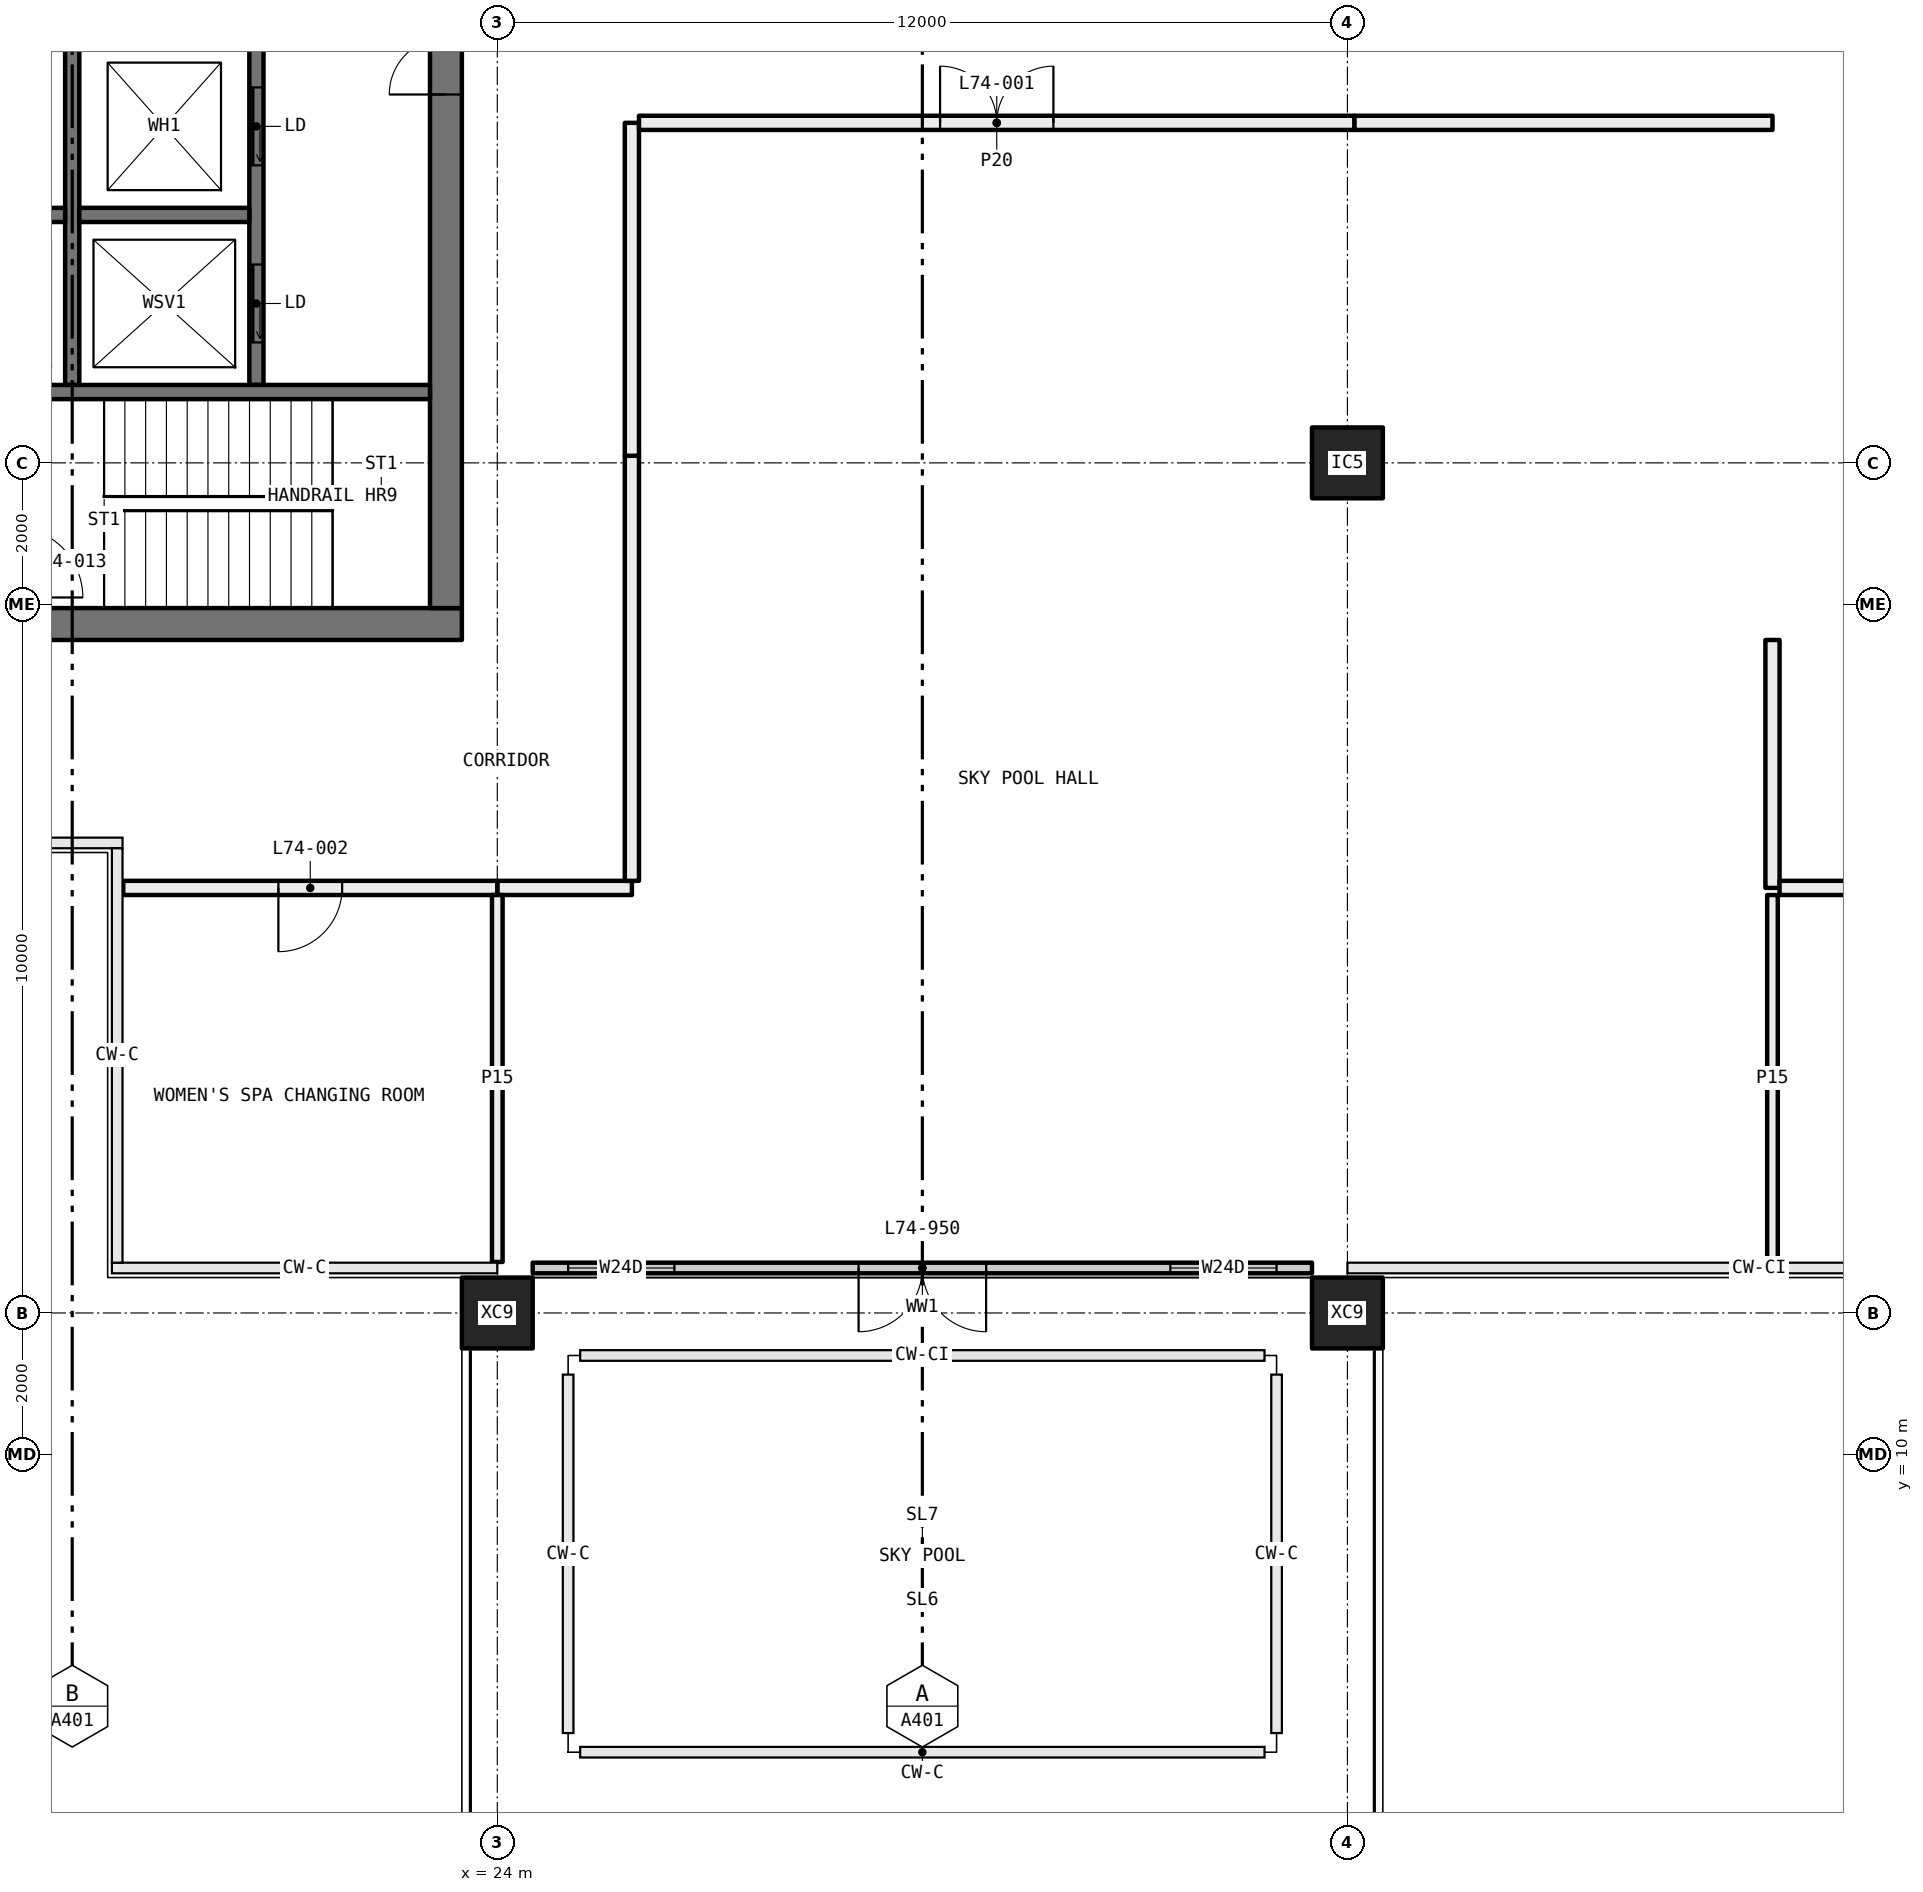
"""IFC4 building model, lengths in metres.
Left out: names, types, materials, properties, quantities, classifications, styles, units other than length and angle.
Written with IfcOpenShell. Run it as: python <this file> out.ifc"""

import sys

from ifc_helpers import new_model, si_unit, direction, frame, frame_2d, origin, origin_2d, place, context, subcontext, project, spatial, rectangle, hollow_rectangle, extrude, element, fill, save


model = new_model("IFC4")
c1 = context("Model", 3, precision=1e-05, world=origin(), true_north=direction((0.0, 1.0)))
c2 = subcontext(c1, "Body", "Model", "MODEL_VIEW")
j1 = project(units=[si_unit("LENGTHUNIT", "METRE"), si_unit("PLANEANGLEUNIT", "RADIAN")], contexts=[c1])
p1 = place(None, origin())
s1 = spatial("IfcSite", under=j1, at=p1, CompositionType="ELEMENT")
p2 = place(p1, origin())
s2 = spatial("IfcBuilding", under=s1, at=p2, CompositionType="ELEMENT")
p3 = place(p2, frame((0.0, 0.0, 273.15)))
s3 = spatial("IfcBuildingStorey", under=s2, at=p3, CompositionType="ELEMENT", Elevation=273.15)
for number, where, z_axis, x_axis in (
    (1, (24.0, 12.0, -0.4), (0.0, 0.0, 1.0), (1.0, 0.0, 0.0)),
    (2, (36.0, 12.0, -0.4), (0.0, 0.0, 1.0), (1.0, 0.0, 0.0)),
):
    element("IfcColumn", number, at=place(p3, frame(where, z_axis=z_axis, x_axis=x_axis)), inside=s3, PredefinedType="COLUMN", context=c2, shape_type="SweptSolid", body=[
        extrude(hollow_rectangle(XDim=1.0, YDim=1.0, WallThickness=0.036, at=origin_2d()), origin(), (0.0, 0.0, 1.0), 4.8),
    ])
p4 = place(p3, frame((36.0, 24.0, 0.0), z_axis=(0.0, 0.0, 1.0), x_axis=(1.0, 0.0, 0.0)))
e3 = element("IfcColumn", 3, at=p4, inside=s3, PredefinedType="COLUMN", context=c2, shape_type="SweptSolid", body=[
    extrude(hollow_rectangle(XDim=1.0, YDim=1.0, WallThickness=0.04, at=origin_2d()), origin(), (0.0, 0.0, 1.0), 4.4),
])
p5 = place(p3, frame((24.0, 18.0, 0.0), z_axis=(0.0, 0.0, 1.0), x_axis=(1.0, 0.0, 0.0)))
e4 = element("IfcWall", 4, at=p5, inside=s3, PredefinedType="PARTITIONING", context=c2, shape_type="SweptSolid", body=[
    extrude(rectangle(XDim=1.9, YDim=0.2, at=frame_2d((0.95, 0.0))), origin(), (0.0, 0.0, 1.0), 4.4),
])
p6 = place(p3, frame((25.9, 18.1, 0.0), z_axis=(0.0, 0.0, 1.0), x_axis=(0.0, 1.0, 0.0)))
e5 = element("IfcWall", 5, at=p6, inside=s3, PredefinedType="PARTITIONING", context=c2, shape_type="SweptSolid", body=[
    extrude(rectangle(XDim=6.0, YDim=0.2, at=frame_2d((3.0, 0.0))), origin(), (0.0, 0.0, 1.0), 3.8),
])
p7 = place(p3, frame((25.9, 24.1, 0.0), z_axis=(0.0, 0.0, 1.0), x_axis=(0.0, 1.0, 0.0)))
e6 = element("IfcWall", 6, at=p7, inside=s3, PredefinedType="PARTITIONING", context=c2, shape_type="SweptSolid", body=[
    extrude(rectangle(XDim=4.7, YDim=0.2, at=frame_2d((2.35, 0.0))), origin(), (0.0, 0.0, 1.0), 4.4),
])
p8 = place(p3, frame((26.0, 28.8, 0.0), z_axis=(0.0, 0.0, 1.0), x_axis=(1.0, 0.0, 0.0)))
e7 = element("IfcWall", 7, at=p8, inside=s3, PredefinedType="PARTITIONING", context=c2, shape_type="SweptSolid", body=[
    extrude(rectangle(XDim=10.1, YDim=0.2, at=frame_2d((5.05, 0.0))), origin(), (0.0, 0.0, 1.0), 3.8),
])
p9 = place(p8, frame((4.25, 0.0, 0.0)))
e8 = element("IfcOpeningElement", 8, at=p9, cuts=e7, PredefinedType="OPENING", context=c2, shape_type="SweptSolid", body=[
    extrude(rectangle(XDim=1.6, YDim=2.1, at=frame_2d((0.8, 1.05))), frame((0.0, 0.11, 0.0), z_axis=(0.0, -1.0, 0.0), x_axis=(1.0, 0.0, 0.0)), (0.0, 0.0, 1.0), 0.22),
])
p10 = place(p3, frame((36.1, 28.8, 0.0), z_axis=(0.0, 0.0, 1.0), x_axis=(1.0, 0.0, 0.0)))
e9 = element("IfcWall", 9, at=p10, inside=s3, PredefinedType="PARTITIONING", context=c2, shape_type="SweptSolid", body=[
    extrude(rectangle(XDim=5.9, YDim=0.2, at=frame_2d((2.95, 0.0))), origin(), (0.0, 0.0, 1.0), 4.4),
])
p11 = place(p3, frame((42.0, 21.5, 0.0), z_axis=(0.0, 0.0, 1.0), x_axis=(0.0, -1.0, 0.0)))
e10 = element("IfcWall", 10, at=p11, inside=s3, PredefinedType="PARTITIONING", context=c2, shape_type="SweptSolid", body=[
    extrude(rectangle(XDim=3.5, YDim=0.2, at=frame_2d((1.75, 0.0))), origin(), (0.0, 0.0, 1.0), 4.4),
])
p12 = place(p3, frame((18.72, 18.0, 0.0), z_axis=(0.0, 0.0, 1.0), x_axis=(1.0, 0.0, 0.0)))
e11 = element("IfcWall", 11, at=p12, inside=s3, PredefinedType="PARTITIONING", context=c2, shape_type="SweptSolid", body=[
    extrude(rectangle(XDim=5.28, YDim=0.2, at=frame_2d((2.64, 0.0))), origin(), (0.0, 0.0, 1.0), 4.4),
])
p13 = place(p12, frame((2.19, 0.0, 0.0)))
e12 = element("IfcOpeningElement", 12, at=p13, cuts=e11, PredefinedType="OPENING", context=c2, shape_type="SweptSolid", body=[
    extrude(rectangle(XDim=0.9, YDim=2.1, at=frame_2d((0.45, 1.05))), frame((0.0, 0.11, 0.0), z_axis=(0.0, -1.0, 0.0), x_axis=(1.0, 0.0, 0.0)), (0.0, 0.0, 1.0), 0.22),
])
p14 = place(p3, frame((42.1, 18.0, 0.0), z_axis=(0.0, 0.0, 1.0), x_axis=(1.0, 0.0, 0.0)))
e13 = element("IfcWall", 13, at=p14, inside=s3, PredefinedType="PARTITIONING", context=c2, shape_type="SweptSolid", body=[
    extrude(rectangle(XDim=11.18, YDim=0.2, at=frame_2d((5.59, 0.0))), origin(), (0.0, 0.0, 1.0), 4.4),
])
p15 = place(p14, frame((5.14, 0.0, 0.0)))
e14 = element("IfcOpeningElement", 14, at=p15, cuts=e13, PredefinedType="OPENING", context=c2, shape_type="SweptSolid", body=[
    extrude(rectangle(XDim=0.9, YDim=2.1, at=frame_2d((0.45, 1.05))), frame((0.0, 0.11, 0.0), z_axis=(0.0, -1.0, 0.0), x_axis=(1.0, 0.0, 0.0)), (0.0, 0.0, 1.0), 0.22),
])
for number, where, z_axis, x_axis in (
    (15, (24.0, 17.9, 0.0), (0.0, 0.0, 1.0), (0.0, -1.0, 0.0)),
    (16, (42.0, 12.72, 0.0), (0.0, 0.0, 1.0), (0.0, 1.0, 0.0)),
):
    element("IfcWall", number, at=place(p3, frame(where, z_axis=z_axis, x_axis=x_axis)), inside=s3, PredefinedType="PARTITIONING", context=c2, shape_type="SweptSolid", body=[
        extrude(rectangle(XDim=5.18, YDim=0.15, at=frame_2d((2.59, 0.0))), origin(), (0.0, 0.0, 1.0), 4.4),
    ])
p16 = place(p3, frame((12.5, 21.725, 0.0), z_axis=(0.0, 0.0, 1.0), x_axis=(1.0, 0.0, 0.0)))
e17 = element("IfcWall", 17, at=p16, inside=s3, PredefinedType="SHEAR", context=c2, shape_type="SweptSolid", body=[
    extrude(rectangle(XDim=11.0, YDim=0.45, at=frame_2d((5.5, 0.0))), origin(), (0.0, 0.0, 1.0), 4.4),
])
p17 = place(p16, frame((1.125, 0.0, 0.0)))
e18 = element("IfcOpeningElement", 18, at=p17, cuts=e17, PredefinedType="OPENING", context=c2, shape_type="SweptSolid", body=[
    extrude(rectangle(XDim=1.0, YDim=2.1, at=frame_2d((0.5, 1.05))), frame((0.0, 0.235, 0.0), z_axis=(0.0, -1.0, 0.0), x_axis=(1.0, 0.0, 0.0)), (0.0, 0.0, 1.0), 0.47),
])
p18 = place(p3, frame((23.275, 21.95, 0.0), z_axis=(0.0, 0.0, 1.0), x_axis=(0.0, 1.0, 0.0)))
e19 = element("IfcWall", 19, at=p18, inside=s3, PredefinedType="SHEAR", context=c2, shape_type="SweptSolid", body=[
    extrude(rectangle(XDim=16.1, YDim=0.45, at=frame_2d((8.05, 0.0))), origin(), (0.0, 0.0, 1.0), 4.4),
])
p19 = place(p18, frame((7.25, 0.0, 0.0)))
e20 = element("IfcOpeningElement", 20, at=p19, cuts=e19, PredefinedType="OPENING", context=c2, shape_type="SweptSolid", body=[
    extrude(rectangle(XDim=1.6, YDim=2.1, at=frame_2d((0.8, 1.05))), frame((0.0, 0.235, 0.0), z_axis=(0.0, -1.0, 0.0), x_axis=(1.0, 0.0, 0.0)), (0.0, 0.0, 1.0), 0.47),
])
p20 = place(p3, frame((20.6, 25.1, 0.0), z_axis=(0.0, 0.0, 1.0), x_axis=(0.0, 1.0, 0.0)))
e21 = element("IfcWall", 21, at=p20, inside=s3, PredefinedType="SOLIDWALL", context=c2, shape_type="SweptSolid", body=[
    extrude(rectangle(XDim=12.95, YDim=0.2, at=frame_2d((6.475, 0.0))), origin(), (0.0, 0.0, 1.0), 4.4),
])
p21 = place(p20, frame((0.6, 0.0, 0.0)))
e22 = element("IfcOpeningElement", 22, at=p21, cuts=e21, PredefinedType="OPENING", context=c2, shape_type="SweptSolid", body=[
    extrude(rectangle(XDim=1.1, YDim=2.1, at=frame_2d((0.55, 1.05))), frame((0.0, 0.11, 0.0), z_axis=(0.0, -1.0, 0.0), x_axis=(1.0, 0.0, 0.0)), (0.0, 0.0, 1.0), 0.22),
])
p22 = place(p20, frame((3.1, 0.0, 0.0)))
e23 = element("IfcOpeningElement", 23, at=p22, cuts=e21, PredefinedType="OPENING", context=c2, shape_type="SweptSolid", body=[
    extrude(rectangle(XDim=1.1, YDim=2.1, at=frame_2d((0.55, 1.05))), frame((0.0, 0.11, 0.0), z_axis=(0.0, -1.0, 0.0), x_axis=(1.0, 0.0, 0.0)), (0.0, 0.0, 1.0), 0.22),
])
p23 = place(p20, frame((5.6, 0.0, 0.0)))
e24 = element("IfcOpeningElement", 24, at=p23, cuts=e21, PredefinedType="OPENING", context=c2, shape_type="SweptSolid", body=[
    extrude(rectangle(XDim=1.1, YDim=2.1, at=frame_2d((0.55, 1.05))), frame((0.0, 0.11, 0.0), z_axis=(0.0, -1.0, 0.0), x_axis=(1.0, 0.0, 0.0)), (0.0, 0.0, 1.0), 0.22),
])
p24 = place(p20, frame((8.1, 0.0, 0.0)))
e25 = element("IfcOpeningElement", 25, at=p24, cuts=e21, PredefinedType="OPENING", context=c2, shape_type="SweptSolid", body=[
    extrude(rectangle(XDim=1.1, YDim=2.1, at=frame_2d((0.55, 1.05))), frame((0.0, 0.11, 0.0), z_axis=(0.0, -1.0, 0.0), x_axis=(1.0, 0.0, 0.0)), (0.0, 0.0, 1.0), 0.22),
])
p25 = place(p20, frame((10.975, 0.0, 0.0)))
e26 = element("IfcOpeningElement", 26, at=p25, cuts=e21, PredefinedType="OPENING", context=c2, shape_type="SweptSolid", body=[
    extrude(rectangle(XDim=1.0, YDim=2.1, at=frame_2d((0.5, 1.05))), frame((0.0, 0.11, 0.0), z_axis=(0.0, -1.0, 0.0), x_axis=(1.0, 0.0, 0.0)), (0.0, 0.0, 1.0), 0.22),
])
p26 = place(p3, frame((18.0, 25.1, 0.0), z_axis=(0.0, 0.0, 1.0), x_axis=(0.0, 1.0, 0.0)))
e27 = element("IfcWall", 27, at=p26, inside=s3, PredefinedType="SOLIDWALL", context=c2, shape_type="SweptSolid", body=[
    extrude(rectangle(XDim=9.8, YDim=0.2, at=frame_2d((4.9, 0.0))), origin(), (0.0, 0.0, 1.0), 4.4),
])
p27 = place(p3, frame((15.5, 25.0, 0.0), z_axis=(0.0, 0.0, 1.0), x_axis=(1.0, 0.0, 0.0)))
e28 = element("IfcWall", 28, at=p27, inside=s3, PredefinedType="SOLIDWALL", context=c2, shape_type="SweptSolid", body=[
    extrude(rectangle(XDim=7.55, YDim=0.2, at=frame_2d((3.775, 0.0))), origin(), (0.0, 0.0, 1.0), 4.4),
])
for number, where, z_axis, x_axis in (
    (29, (15.5, 27.5, 0.0), (0.0, 0.0, 1.0), (1.0, 0.0, 0.0)),
    (30, (18.1, 27.5, 0.0), (0.0, 0.0, 1.0), (1.0, 0.0, 0.0)),
):
    element("IfcWall", number, at=place(p3, frame(where, z_axis=z_axis, x_axis=x_axis)), inside=s3, PredefinedType="SOLIDWALL", context=c2, shape_type="SweptSolid", body=[
        extrude(rectangle(XDim=2.4, YDim=0.2, at=frame_2d((1.2, 0.0))), origin(), (0.0, 0.0, 1.0), 4.4),
    ])
p28 = place(p3, frame((24.5, 12.635, 0.0), z_axis=(0.0, 0.0, 1.0), x_axis=(1.0, 0.0, 0.0)))
e31 = element("IfcWall", 31, at=p28, inside=s3, PredefinedType="ELEMENTEDWALL", context=c2, shape_type="SweptSolid", body=[
    extrude(rectangle(XDim=11.0, YDim=0.15, at=frame_2d((5.5, 0.0))), origin(), (0.0, 0.0, 1.0), 4.4),
])
p29 = place(p28, frame((0.5, 0.0, 0.45)))
e32 = element("IfcOpeningElement", 32, at=p29, cuts=e31, PredefinedType="OPENING", context=c2, shape_type="SweptSolid", body=[
    extrude(rectangle(XDim=1.5, YDim=3.6, at=frame_2d((0.75, 1.8))), frame((0.0, 0.085, 0.0), z_axis=(0.0, -1.0, 0.0), x_axis=(1.0, 0.0, 0.0)), (0.0, 0.0, 1.0), 0.17),
])
p30 = place(p28, frame((9.0, 0.0, 0.45)))
e33 = element("IfcOpeningElement", 33, at=p30, cuts=e31, PredefinedType="OPENING", context=c2, shape_type="SweptSolid", body=[
    extrude(rectangle(XDim=1.5, YDim=3.6, at=frame_2d((0.75, 1.8))), frame((0.0, 0.085, 0.0), z_axis=(0.0, -1.0, 0.0), x_axis=(1.0, 0.0, 0.0)), (0.0, 0.0, 1.0), 0.17),
])
p31 = place(p28, frame((4.6, 0.0, 0.0)))
e34 = element("IfcOpeningElement", 34, at=p31, cuts=e31, PredefinedType="OPENING", context=c2, shape_type="SweptSolid", body=[
    extrude(rectangle(XDim=1.8, YDim=2.4, at=frame_2d((0.9, 1.2))), frame((0.0, 0.085, 0.0), z_axis=(0.0, -1.0, 0.0), x_axis=(1.0, 0.0, 0.0)), (0.0, 0.0, 1.0), 0.17),
])
p32 = place(p9, origin())
e35 = element("IfcDoor", 35, at=p32, inside=s3, OperationType="DOUBLE_DOOR_SINGLE_SWING", PredefinedType="DOOR", context=c2, shape_type="SweptSolid", body=[
    extrude(rectangle(XDim=1.6, YDim=2.1, at=frame_2d((0.8, 1.05))), frame((0.0, 0.025, 0.0), z_axis=(0.0, -1.0, 0.0), x_axis=(1.0, 0.0, 0.0)), (0.0, 0.0, 1.0), 0.05),
])
fill(e8, e35)
p33 = place(p13, frame((0.9, 0.0, 0.0), x_axis=(-1.0, 0.0, 0.0)))
e36 = element("IfcDoor", 36, at=p33, inside=s3, OperationType="SINGLE_SWING_LEFT", PredefinedType="DOOR", context=c2, shape_type="SweptSolid", body=[
    extrude(rectangle(XDim=0.9, YDim=2.1, at=frame_2d((0.45, 1.05))), frame((0.0, 0.025, 0.0), z_axis=(0.0, -1.0, 0.0), x_axis=(1.0, 0.0, 0.0)), (0.0, 0.0, 1.0), 0.05),
])
fill(e12, e36)
p34 = place(p21, origin())
e37 = element("IfcDoor", 37, at=p34, inside=s3, OperationType="SLIDING_TO_LEFT", PredefinedType="DOOR", context=c2, shape_type="SweptSolid", body=[
    extrude(rectangle(XDim=1.1, YDim=2.1, at=frame_2d((0.55, 1.05))), frame((0.0, 0.025, 0.0), z_axis=(0.0, -1.0, 0.0), x_axis=(1.0, 0.0, 0.0)), (0.0, 0.0, 1.0), 0.05),
])
fill(e22, e37)
p35 = place(p22, origin())
e38 = element("IfcDoor", 38, at=p35, inside=s3, OperationType="SLIDING_TO_LEFT", PredefinedType="DOOR", context=c2, shape_type="SweptSolid", body=[
    extrude(rectangle(XDim=1.1, YDim=2.1, at=frame_2d((0.55, 1.05))), frame((0.0, 0.025, 0.0), z_axis=(0.0, -1.0, 0.0), x_axis=(1.0, 0.0, 0.0)), (0.0, 0.0, 1.0), 0.05),
])
fill(e23, e38)
p36 = place(p19, origin())
e39 = element("IfcDoor", 39, at=p36, inside=s3, OperationType="DOUBLE_DOOR_SINGLE_SWING", PredefinedType="DOOR", context=c2, shape_type="SweptSolid", body=[
    extrude(rectangle(XDim=1.6, YDim=2.1, at=frame_2d((0.8, 1.05))), frame((0.0, 0.025, 0.0), z_axis=(0.0, -1.0, 0.0), x_axis=(1.0, 0.0, 0.0)), (0.0, 0.0, 1.0), 0.05),
])
fill(e20, e39)
p37 = place(p29, origin())
e40 = element("IfcWindow", 40, at=p37, inside=s3, PartitioningType="SINGLE_PANEL", PredefinedType="WINDOW", context=c2, shape_type="SweptSolid", body=[
    extrude(rectangle(XDim=1.5, YDim=3.6, at=frame_2d((0.75, 1.8))), frame((0.0, 0.03, 0.0), z_axis=(0.0, -1.0, 0.0), x_axis=(1.0, 0.0, 0.0)), (0.0, 0.0, 1.0), 0.06),
])
fill(e32, e40)
p38 = place(p30, origin())
e41 = element("IfcWindow", 41, at=p38, inside=s3, PartitioningType="SINGLE_PANEL", PredefinedType="WINDOW", context=c2, shape_type="SweptSolid", body=[
    extrude(rectangle(XDim=1.5, YDim=3.6, at=frame_2d((0.75, 1.8))), frame((0.0, 0.03, 0.0), z_axis=(0.0, -1.0, 0.0), x_axis=(1.0, 0.0, 0.0)), (0.0, 0.0, 1.0), 0.06),
])
fill(e33, e41)
p39 = place(p31, frame((1.8, 0.0, 0.0), x_axis=(-1.0, 0.0, 0.0)))
e42 = element("IfcDoor", 42, at=p39, inside=s3, OperationType="DOUBLE_DOOR_SINGLE_SWING", PredefinedType="DOOR", context=c2, shape_type="SweptSolid", body=[
    extrude(rectangle(XDim=1.8, YDim=2.4, at=frame_2d((0.9, 1.2))), frame((0.0, 0.025, 0.0), z_axis=(0.0, -1.0, 0.0), x_axis=(1.0, 0.0, 0.0)), (0.0, 0.0, 1.0), 0.05),
])
fill(e34, e42)
save(model, sys.argv[1])
